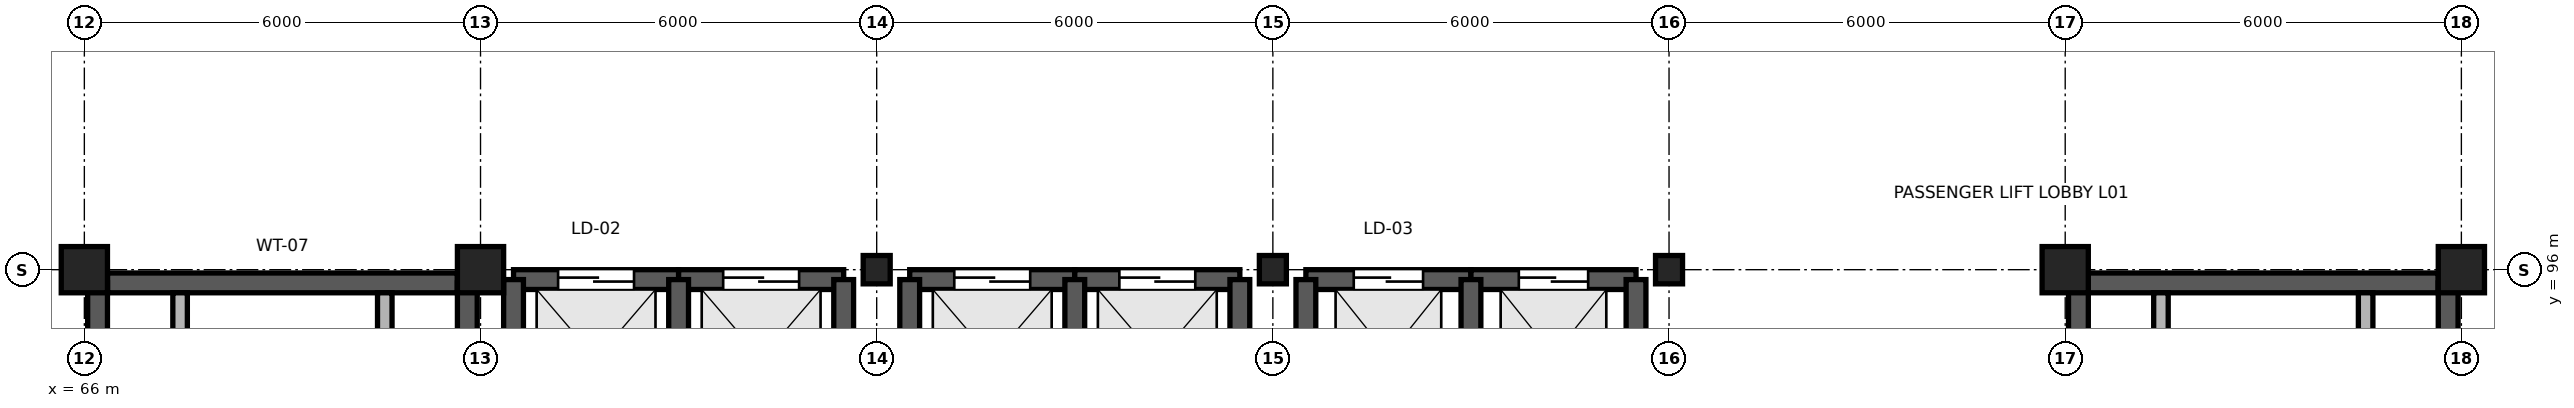
"""IFC4 building model, lengths in metres.
Left out: names, types, materials, properties, quantities, classifications, styles, units other than length and angle.
Written with IfcOpenShell. Run it as: python <this file> out.ifc"""

import sys

from ifc_helpers import new_model, si_unit, direction, frame, frame_2d, origin, origin_2d, place, context, subcontext, project, spatial, rectangle, i_section, extrude, element, fill, save


model = new_model("IFC4")
c1 = context("Model", 3, precision=1e-05, world=origin(), true_north=direction((0.0, 1.0)))
c2 = subcontext(c1, "Body", "Model", "MODEL_VIEW")
j1 = project(units=[si_unit("LENGTHUNIT", "METRE"), si_unit("PLANEANGLEUNIT", "RADIAN")], contexts=[c1])
p1 = place(None, origin())
s1 = spatial("IfcSite", under=j1, at=p1, CompositionType="ELEMENT")
p2 = place(p1, origin())
s2 = spatial("IfcBuilding", under=s1, at=p2, CompositionType="ELEMENT")
p3 = place(p2, origin())
s3 = spatial("IfcBuildingStorey", under=s2, at=p3, CompositionType="ELEMENT", Elevation=0.0)
for number, where, z_axis, x_axis in (
    (1, (66.0, 96.0, 0.0), (0.0, 0.0, 1.0), (1.0, 0.0, 0.0)),
    (2, (72.0, 96.0, 0.0), (0.0, 0.0, 1.0), (1.0, 0.0, 0.0)),
):
    element("IfcColumn", number, at=place(p3, frame(where, z_axis=z_axis, x_axis=x_axis)), inside=s3, PredefinedType="COLUMN", context=c2, shape_type="SweptSolid", body=[
        extrude(rectangle(XDim=0.7, YDim=0.7, at=origin_2d()), origin(), (0.0, 0.0, 1.0), 6.0),
    ])
for number, where, z_axis, x_axis in (
    (3, (78.0, 96.0, 0.0), (0.0, 0.0, 1.0), (1.0, 0.0, 0.0)),
    (4, (84.0, 96.0, 0.0), (0.0, 0.0, 1.0), (1.0, 0.0, 0.0)),
    (5, (90.0, 96.0, 0.0), (0.0, 0.0, 1.0), (1.0, 0.0, 0.0)),
):
    element("IfcColumn", number, at=place(p3, frame(where, z_axis=z_axis, x_axis=x_axis)), inside=s3, PredefinedType="COLUMN", context=c2, shape_type="SweptSolid", body=[
        extrude(i_section(OverallWidth=0.409, OverallDepth=0.429, WebThickness=0.024, FlangeThickness=0.035, FilletRadius=0.022, at=origin_2d()), origin(), (0.0, 0.0, 1.0), 6.0),
    ])
for number, where, z_axis, x_axis in (
    (6, (96.0, 96.0, 0.0), (0.0, 0.0, 1.0), (1.0, 0.0, 0.0)),
    (7, (102.0, 96.0, 0.0), (0.0, 0.0, 1.0), (1.0, 0.0, 0.0)),
):
    element("IfcColumn", number, at=place(p3, frame(where, z_axis=z_axis, x_axis=x_axis)), inside=s3, PredefinedType="COLUMN", context=c2, shape_type="SweptSolid", body=[
        extrude(rectangle(XDim=0.7, YDim=0.7, at=origin_2d()), origin(), (0.0, 0.0, 1.0), 6.0),
    ])
p4 = place(p3, frame((66.35, 95.8, 0.0), z_axis=(0.0, 0.0, 1.0), x_axis=(1.0, 0.0, 0.0)))
e8 = element("IfcWall", 8, at=p4, inside=s3, PredefinedType="SHEAR", context=c2, shape_type="SweptSolid", body=[
    extrude(rectangle(XDim=5.3, YDim=0.3, at=frame_2d((2.65, 0.0))), origin(), (0.0, 0.0, 1.0), 5.76),
])
for number, where, z_axis, x_axis in (
    (9, (66.2, 84.0, 0.0), (0.0, 0.0, 1.0), (0.0, 1.0, 0.0)),
    (10, (71.8, 84.0, 0.0), (0.0, 0.0, 1.0), (0.0, 1.0, 0.0)),
):
    element("IfcWall", number, at=place(p3, frame(where, z_axis=z_axis, x_axis=x_axis)), inside=s3, PredefinedType="SHEAR", context=c2, shape_type="SweptSolid", body=[
        extrude(rectangle(XDim=11.8, YDim=0.3, at=frame_2d((5.9, 0.0))), origin(), (0.0, 0.0, 1.0), 5.76),
    ])
for number, where, z_axis, x_axis in (
    (11, (67.45, 94.4, 0.0), (0.0, 0.0, 1.0), (0.0, 1.0, 0.0)),
    (12, (70.55, 94.4, 0.0), (0.0, 0.0, 1.0), (0.0, 1.0, 0.0)),
):
    element("IfcWall", number, at=place(p3, frame(where, z_axis=z_axis, x_axis=x_axis)), inside=s3, PredefinedType="PARTITIONING", context=c2, shape_type="SweptSolid", body=[
        extrude(rectangle(XDim=1.25, YDim=0.22, at=frame_2d((0.625, 0.0))), origin(), (0.0, 0.0, 1.0), 5.76),
    ])
p5 = place(p3, frame((96.35, 95.8, 0.0), z_axis=(0.0, 0.0, 1.0), x_axis=(1.0, 0.0, 0.0)))
e13 = element("IfcWall", 13, at=p5, inside=s3, PredefinedType="SHEAR", context=c2, shape_type="SweptSolid", body=[
    extrude(rectangle(XDim=5.3, YDim=0.3, at=frame_2d((2.65, 0.0))), origin(), (0.0, 0.0, 1.0), 5.76),
])
for number, where, z_axis, x_axis in (
    (14, (96.2, 84.0, 0.0), (0.0, 0.0, 1.0), (0.0, 1.0, 0.0)),
    (15, (101.8, 84.0, 0.0), (0.0, 0.0, 1.0), (0.0, 1.0, 0.0)),
):
    element("IfcWall", number, at=place(p3, frame(where, z_axis=z_axis, x_axis=x_axis)), inside=s3, PredefinedType="SHEAR", context=c2, shape_type="SweptSolid", body=[
        extrude(rectangle(XDim=11.8, YDim=0.3, at=frame_2d((5.9, 0.0))), origin(), (0.0, 0.0, 1.0), 5.76),
    ])
for number, where, z_axis, x_axis in (
    (16, (97.45, 94.4, 0.0), (0.0, 0.0, 1.0), (0.0, 1.0, 0.0)),
    (17, (100.55, 94.4, 0.0), (0.0, 0.0, 1.0), (0.0, 1.0, 0.0)),
):
    element("IfcWall", number, at=place(p3, frame(where, z_axis=z_axis, x_axis=x_axis)), inside=s3, PredefinedType="PARTITIONING", context=c2, shape_type="SweptSolid", body=[
        extrude(rectangle(XDim=1.25, YDim=0.22, at=frame_2d((0.625, 0.0))), origin(), (0.0, 0.0, 1.0), 5.76),
    ])
p6 = place(p3, frame((72.5, 95.85, 0.0), z_axis=(0.0, 0.0, 1.0), x_axis=(1.0, 0.0, 0.0)))
e18 = element("IfcWall", 18, at=p6, inside=s3, PredefinedType="SHEAR", context=c2, shape_type="SweptSolid", body=[
    extrude(rectangle(XDim=2.5, YDim=0.3, at=frame_2d((1.25, 0.0))), origin(), (0.0, 0.0, 1.0), 5.76),
])
p7 = place(p6, frame((0.675, 0.0, 0.0)))
e19 = element("IfcOpeningElement", 19, at=p7, cuts=e18, PredefinedType="OPENING", context=c2, shape_type="SweptSolid", body=[
    extrude(rectangle(XDim=1.15, YDim=2.15, at=frame_2d((0.575, 1.075))), frame((0.0, 0.165, 0.0), z_axis=(0.0, -1.0, 0.0), x_axis=(1.0, 0.0, 0.0)), (0.0, 0.0, 1.0), 0.33),
])
p8 = place(p3, frame((72.5, 92.45, 0.0), z_axis=(0.0, 0.0, 1.0), x_axis=(0.0, 1.0, 0.0)))
e20 = element("IfcWall", 20, at=p8, inside=s3, PredefinedType="SHEAR", context=c2, shape_type="SweptSolid", body=[
    extrude(rectangle(XDim=3.4, YDim=0.3, at=frame_2d((1.7, 0.0))), origin(), (0.0, 0.0, 1.0), 5.76),
])
p9 = place(p3, frame((75.0, 95.85, 0.0), z_axis=(0.0, 0.0, 1.0), x_axis=(1.0, 0.0, 0.0)))
e21 = element("IfcWall", 21, at=p9, inside=s3, PredefinedType="SHEAR", context=c2, shape_type="SweptSolid", body=[
    extrude(rectangle(XDim=2.5, YDim=0.3, at=frame_2d((1.25, 0.0))), origin(), (0.0, 0.0, 1.0), 5.76),
])
p10 = place(p9, frame((0.675, 0.0, 0.0)))
e22 = element("IfcOpeningElement", 22, at=p10, cuts=e21, PredefinedType="OPENING", context=c2, shape_type="SweptSolid", body=[
    extrude(rectangle(XDim=1.15, YDim=2.15, at=frame_2d((0.575, 1.075))), frame((0.0, 0.165, 0.0), z_axis=(0.0, -1.0, 0.0), x_axis=(1.0, 0.0, 0.0)), (0.0, 0.0, 1.0), 0.33),
])
for number, where, z_axis, x_axis in (
    (23, (75.0, 92.45, 0.0), (0.0, 0.0, 1.0), (0.0, 1.0, 0.0)),
    (24, (77.5, 92.45, 0.0), (0.0, 0.0, 1.0), (0.0, 1.0, 0.0)),
):
    element("IfcWall", number, at=place(p3, frame(where, z_axis=z_axis, x_axis=x_axis)), inside=s3, PredefinedType="SHEAR", context=c2, shape_type="SweptSolid", body=[
        extrude(rectangle(XDim=3.4, YDim=0.3, at=frame_2d((1.7, 0.0))), origin(), (0.0, 0.0, 1.0), 5.76),
    ])
p11 = place(p3, frame((78.5, 95.85, 0.0), z_axis=(0.0, 0.0, 1.0), x_axis=(1.0, 0.0, 0.0)))
e25 = element("IfcWall", 25, at=p11, inside=s3, PredefinedType="SHEAR", context=c2, shape_type="SweptSolid", body=[
    extrude(rectangle(XDim=2.5, YDim=0.3, at=frame_2d((1.25, 0.0))), origin(), (0.0, 0.0, 1.0), 5.76),
])
p12 = place(p11, frame((0.675, 0.0, 0.0)))
e26 = element("IfcOpeningElement", 26, at=p12, cuts=e25, PredefinedType="OPENING", context=c2, shape_type="SweptSolid", body=[
    extrude(rectangle(XDim=1.15, YDim=2.15, at=frame_2d((0.575, 1.075))), frame((0.0, 0.165, 0.0), z_axis=(0.0, -1.0, 0.0), x_axis=(1.0, 0.0, 0.0)), (0.0, 0.0, 1.0), 0.33),
])
p13 = place(p3, frame((78.5, 92.45, 0.0), z_axis=(0.0, 0.0, 1.0), x_axis=(0.0, 1.0, 0.0)))
e27 = element("IfcWall", 27, at=p13, inside=s3, PredefinedType="SHEAR", context=c2, shape_type="SweptSolid", body=[
    extrude(rectangle(XDim=3.4, YDim=0.3, at=frame_2d((1.7, 0.0))), origin(), (0.0, 0.0, 1.0), 5.76),
])
p14 = place(p3, frame((81.0, 95.85, 0.0), z_axis=(0.0, 0.0, 1.0), x_axis=(1.0, 0.0, 0.0)))
e28 = element("IfcWall", 28, at=p14, inside=s3, PredefinedType="SHEAR", context=c2, shape_type="SweptSolid", body=[
    extrude(rectangle(XDim=2.5, YDim=0.3, at=frame_2d((1.25, 0.0))), origin(), (0.0, 0.0, 1.0), 5.76),
])
p15 = place(p14, frame((0.675, 0.0, 0.0)))
e29 = element("IfcOpeningElement", 29, at=p15, cuts=e28, PredefinedType="OPENING", context=c2, shape_type="SweptSolid", body=[
    extrude(rectangle(XDim=1.15, YDim=2.15, at=frame_2d((0.575, 1.075))), frame((0.0, 0.165, 0.0), z_axis=(0.0, -1.0, 0.0), x_axis=(1.0, 0.0, 0.0)), (0.0, 0.0, 1.0), 0.33),
])
for number, where, z_axis, x_axis in (
    (30, (81.0, 92.45, 0.0), (0.0, 0.0, 1.0), (0.0, 1.0, 0.0)),
    (31, (83.5, 92.45, 0.0), (0.0, 0.0, 1.0), (0.0, 1.0, 0.0)),
):
    element("IfcWall", number, at=place(p3, frame(where, z_axis=z_axis, x_axis=x_axis)), inside=s3, PredefinedType="SHEAR", context=c2, shape_type="SweptSolid", body=[
        extrude(rectangle(XDim=3.4, YDim=0.3, at=frame_2d((1.7, 0.0))), origin(), (0.0, 0.0, 1.0), 5.76),
    ])
p16 = place(p3, frame((84.5, 95.85, 0.0), z_axis=(0.0, 0.0, 1.0), x_axis=(1.0, 0.0, 0.0)))
e32 = element("IfcWall", 32, at=p16, inside=s3, PredefinedType="SHEAR", context=c2, shape_type="SweptSolid", body=[
    extrude(rectangle(XDim=2.5, YDim=0.3, at=frame_2d((1.25, 0.0))), origin(), (0.0, 0.0, 1.0), 5.76),
])
p17 = place(p16, frame((0.725, 0.0, 0.0)))
e33 = element("IfcOpeningElement", 33, at=p17, cuts=e32, PredefinedType="OPENING", context=c2, shape_type="SweptSolid", body=[
    extrude(rectangle(XDim=1.05, YDim=2.1, at=frame_2d((0.525, 1.05))), frame((0.0, 0.165, 0.0), z_axis=(0.0, -1.0, 0.0), x_axis=(1.0, 0.0, 0.0)), (0.0, 0.0, 1.0), 0.33),
])
p18 = place(p3, frame((84.5, 92.45, 0.0), z_axis=(0.0, 0.0, 1.0), x_axis=(0.0, 1.0, 0.0)))
e34 = element("IfcWall", 34, at=p18, inside=s3, PredefinedType="SHEAR", context=c2, shape_type="SweptSolid", body=[
    extrude(rectangle(XDim=3.4, YDim=0.3, at=frame_2d((1.7, 0.0))), origin(), (0.0, 0.0, 1.0), 5.76),
])
p19 = place(p3, frame((87.0, 95.85, 0.0), z_axis=(0.0, 0.0, 1.0), x_axis=(1.0, 0.0, 0.0)))
e35 = element("IfcWall", 35, at=p19, inside=s3, PredefinedType="SHEAR", context=c2, shape_type="SweptSolid", body=[
    extrude(rectangle(XDim=2.5, YDim=0.3, at=frame_2d((1.25, 0.0))), origin(), (0.0, 0.0, 1.0), 5.76),
])
p20 = place(p19, frame((0.725, 0.0, 0.0)))
e36 = element("IfcOpeningElement", 36, at=p20, cuts=e35, PredefinedType="OPENING", context=c2, shape_type="SweptSolid", body=[
    extrude(rectangle(XDim=1.05, YDim=2.1, at=frame_2d((0.525, 1.05))), frame((0.0, 0.165, 0.0), z_axis=(0.0, -1.0, 0.0), x_axis=(1.0, 0.0, 0.0)), (0.0, 0.0, 1.0), 0.33),
])
for number, where, z_axis, x_axis in (
    (37, (87.0, 92.45, 0.0), (0.0, 0.0, 1.0), (0.0, 1.0, 0.0)),
    (38, (89.5, 92.45, 0.0), (0.0, 0.0, 1.0), (0.0, 1.0, 0.0)),
):
    element("IfcWall", number, at=place(p3, frame(where, z_axis=z_axis, x_axis=x_axis)), inside=s3, PredefinedType="SHEAR", context=c2, shape_type="SweptSolid", body=[
        extrude(rectangle(XDim=3.4, YDim=0.3, at=frame_2d((1.7, 0.0))), origin(), (0.0, 0.0, 1.0), 5.76),
    ])
p21 = place(p7, origin())
e39 = element("IfcDoor", 39, at=p21, inside=s3, OperationType="DOUBLE_DOOR_SLIDING", PredefinedType="DOOR", context=c2, shape_type="SweptSolid", body=[
    extrude(rectangle(XDim=1.15, YDim=2.15, at=frame_2d((0.575, 1.075))), frame((0.0, 0.025, 0.0), z_axis=(0.0, -1.0, 0.0), x_axis=(1.0, 0.0, 0.0)), (0.0, 0.0, 1.0), 0.05),
])
fill(e19, e39)
p22 = place(p10, origin())
e40 = element("IfcDoor", 40, at=p22, inside=s3, OperationType="DOUBLE_DOOR_SLIDING", PredefinedType="DOOR", context=c2, shape_type="SweptSolid", body=[
    extrude(rectangle(XDim=1.15, YDim=2.15, at=frame_2d((0.575, 1.075))), frame((0.0, 0.025, 0.0), z_axis=(0.0, -1.0, 0.0), x_axis=(1.0, 0.0, 0.0)), (0.0, 0.0, 1.0), 0.05),
])
fill(e22, e40)
p23 = place(p12, origin())
e41 = element("IfcDoor", 41, at=p23, inside=s3, OperationType="DOUBLE_DOOR_SLIDING", PredefinedType="DOOR", context=c2, shape_type="SweptSolid", body=[
    extrude(rectangle(XDim=1.15, YDim=2.15, at=frame_2d((0.575, 1.075))), frame((0.0, 0.025, 0.0), z_axis=(0.0, -1.0, 0.0), x_axis=(1.0, 0.0, 0.0)), (0.0, 0.0, 1.0), 0.05),
])
fill(e26, e41)
p24 = place(p15, origin())
e42 = element("IfcDoor", 42, at=p24, inside=s3, OperationType="DOUBLE_DOOR_SLIDING", PredefinedType="DOOR", context=c2, shape_type="SweptSolid", body=[
    extrude(rectangle(XDim=1.15, YDim=2.15, at=frame_2d((0.575, 1.075))), frame((0.0, 0.025, 0.0), z_axis=(0.0, -1.0, 0.0), x_axis=(1.0, 0.0, 0.0)), (0.0, 0.0, 1.0), 0.05),
])
fill(e29, e42)
p25 = place(p17, origin())
e43 = element("IfcDoor", 43, at=p25, inside=s3, OperationType="DOUBLE_DOOR_SLIDING", PredefinedType="DOOR", context=c2, shape_type="SweptSolid", body=[
    extrude(rectangle(XDim=1.05, YDim=2.1, at=frame_2d((0.525, 1.05))), frame((0.0, 0.025, 0.0), z_axis=(0.0, -1.0, 0.0), x_axis=(1.0, 0.0, 0.0)), (0.0, 0.0, 1.0), 0.05),
])
fill(e33, e43)
p26 = place(p20, origin())
e44 = element("IfcDoor", 44, at=p26, inside=s3, OperationType="DOUBLE_DOOR_SLIDING", PredefinedType="DOOR", context=c2, shape_type="SweptSolid", body=[
    extrude(rectangle(XDim=1.05, YDim=2.1, at=frame_2d((0.525, 1.05))), frame((0.0, 0.025, 0.0), z_axis=(0.0, -1.0, 0.0), x_axis=(1.0, 0.0, 0.0)), (0.0, 0.0, 1.0), 0.05),
])
fill(e36, e44)
save(model, sys.argv[1])
